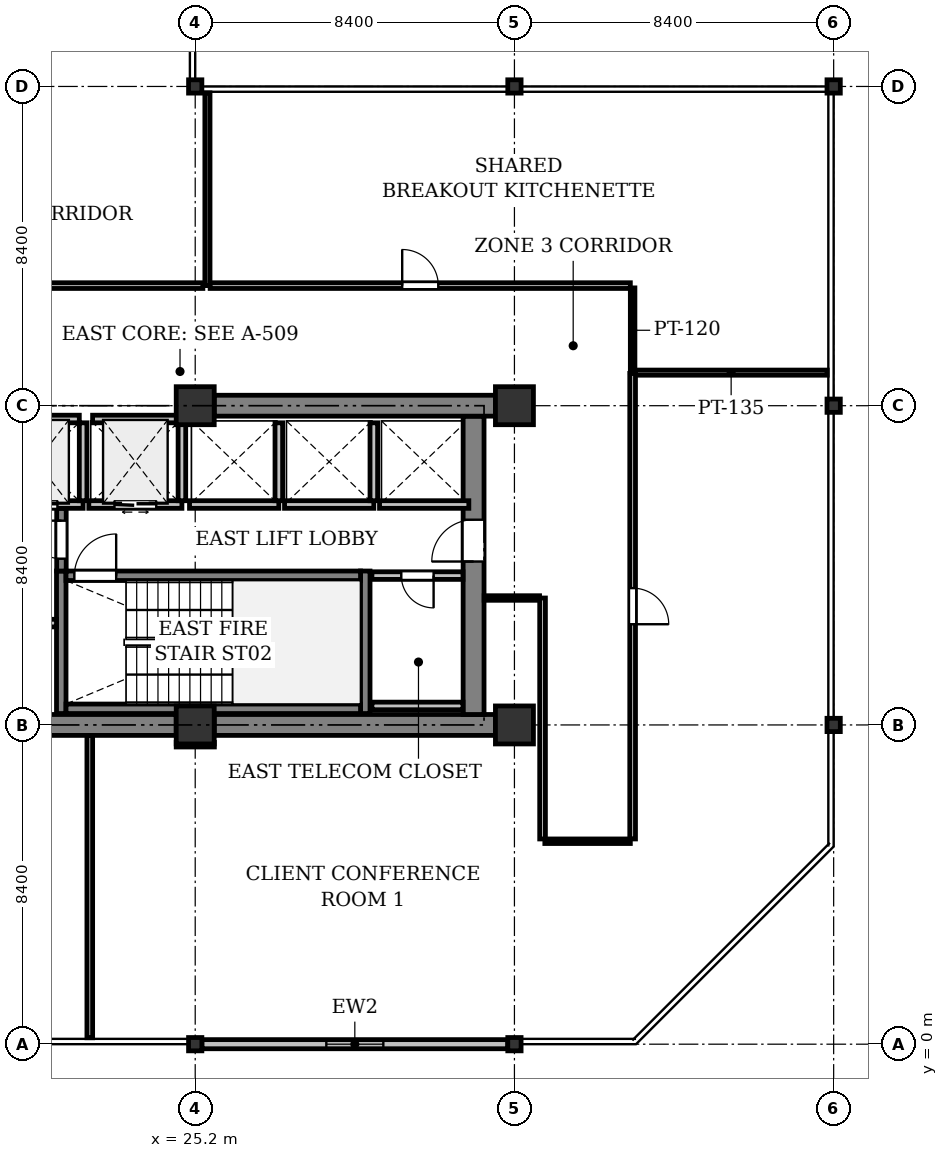
"""IFC4 building model, lengths in metres.
Left out: names, types, materials, properties, quantities, classifications, styles, units other than length and angle.
Written with IfcOpenShell. Run it as: python <this file> out.ifc"""

import sys

from ifc_helpers import new_model, si_unit, direction, frame, frame_2d, origin, origin_2d, place, context, subcontext, project, spatial, rectangle, i_section, extrude, element, fill, save


model = new_model("IFC4")
c1 = context("Model", 3, precision=1e-05, world=origin(), true_north=direction((0.0, 1.0)))
c2 = subcontext(c1, "Body", "Model", "MODEL_VIEW")
j1 = project(units=[si_unit("LENGTHUNIT", "METRE"), si_unit("PLANEANGLEUNIT", "RADIAN")], contexts=[c1])
p1 = place(None, origin())
s1 = spatial("IfcSite", under=j1, at=p1, CompositionType="ELEMENT")
p2 = place(p1, origin())
s2 = spatial("IfcBuilding", under=s1, at=p2, CompositionType="ELEMENT")
p3 = place(p2, frame((0.0, 0.0, 196.0)))
s3 = spatial("IfcBuildingStorey", under=s2, at=p3, CompositionType="ELEMENT", Elevation=196.0)
p4 = place(p3, frame((25.2, 0.0, 0.0), z_axis=(0.0, 0.0, 1.0), x_axis=(1.0, 0.0, 0.0)))
e1 = element("IfcColumn", 1, at=p4, inside=s3, PredefinedType="COLUMN", context=c2, shape_type="SweptSolid", body=[
    extrude(i_section(OverallWidth=0.35, OverallDepth=0.35, WebThickness=0.02, FlangeThickness=0.032, at=origin_2d()), origin(), (0.0, 0.0, 1.0), 4.1),
])
for number, where, z_axis, x_axis in (
    (2, (25.2, 8.4, 0.0), (0.0, 0.0, 1.0), (1.0, 0.0, 0.0)),
    (3, (25.2, 16.8, 0.0), (0.0, 0.0, 1.0), (1.0, 0.0, 0.0)),
):
    element("IfcColumn", number, at=place(p3, frame(where, z_axis=z_axis, x_axis=x_axis)), inside=s3, PredefinedType="COLUMN", context=c2, shape_type="SweptSolid", body=[
        extrude(rectangle(XDim=1.0, YDim=1.0, at=origin_2d()), origin(), (0.0, 0.0, 1.0), 4.1),
    ])
for number, where, z_axis, x_axis in (
    (4, (25.2, 25.2, 0.0), (0.0, 0.0, 1.0), (1.0, 0.0, 0.0)),
    (5, (33.6, 0.0, 0.0), (0.0, 0.0, 1.0), (1.0, 0.0, 0.0)),
):
    element("IfcColumn", number, at=place(p3, frame(where, z_axis=z_axis, x_axis=x_axis)), inside=s3, PredefinedType="COLUMN", context=c2, shape_type="SweptSolid", body=[
        extrude(i_section(OverallWidth=0.35, OverallDepth=0.35, WebThickness=0.02, FlangeThickness=0.032, at=origin_2d()), origin(), (0.0, 0.0, 1.0), 4.1),
    ])
for number, where, z_axis, x_axis in (
    (6, (33.6, 8.4, 0.0), (0.0, 0.0, 1.0), (1.0, 0.0, 0.0)),
    (7, (33.6, 16.8, 0.0), (0.0, 0.0, 1.0), (1.0, 0.0, 0.0)),
):
    element("IfcColumn", number, at=place(p3, frame(where, z_axis=z_axis, x_axis=x_axis)), inside=s3, PredefinedType="COLUMN", context=c2, shape_type="SweptSolid", body=[
        extrude(rectangle(XDim=1.0, YDim=1.0, at=origin_2d()), origin(), (0.0, 0.0, 1.0), 4.1),
    ])
for number, where, z_axis, x_axis in (
    (8, (33.6, 25.2, 0.0), (0.0, 0.0, 1.0), (1.0, 0.0, 0.0)),
    (9, (42.0, 8.4, 0.0), (0.0, 0.0, 1.0), (1.0, 0.0, 0.0)),
    (10, (42.0, 16.8, 0.0), (0.0, 0.0, 1.0), (1.0, 0.0, 0.0)),
    (11, (42.0, 25.2, 0.0), (0.0, 0.0, 1.0), (1.0, 0.0, 0.0)),
):
    element("IfcColumn", number, at=place(p3, frame(where, z_axis=z_axis, x_axis=x_axis)), inside=s3, PredefinedType="COLUMN", context=c2, shape_type="SweptSolid", body=[
        extrude(i_section(OverallWidth=0.35, OverallDepth=0.35, WebThickness=0.02, FlangeThickness=0.032, at=origin_2d()), origin(), (0.0, 0.0, 1.0), 4.1),
    ])
p5 = place(p3, frame((33.425, 0.0, 0.0), z_axis=(0.0, 0.0, 1.0), x_axis=(-1.0, 0.0, 0.0)))
e12 = element("IfcWall", 12, at=p5, inside=s3, PredefinedType="STANDARD", context=c2, shape_type="SweptSolid", body=[
    extrude(rectangle(XDim=8.05, YDim=0.24, at=frame_2d((4.025, 0.0))), origin(), (0.0, 0.0, 1.0), 3.525),
])
p6 = place(p5, frame((3.275, 0.0, 0.9)))
e13 = element("IfcOpeningElement", 13, at=p6, cuts=e12, PredefinedType="OPENING", context=c2, shape_type="SweptSolid", body=[
    extrude(rectangle(XDim=1.5, YDim=1.6, at=frame_2d((0.75, 0.8))), frame((0.0, 0.13, 0.0), z_axis=(0.0, -1.0, 0.0), x_axis=(1.0, 0.0, 0.0)), (0.0, 0.0, 1.0), 0.26),
])
p7 = place(p3, frame((17.3, 8.4, 0.0), z_axis=(0.0, 0.0, 1.0), x_axis=(1.0, 0.0, 0.0)))
e14 = element("IfcWall", 14, at=p7, inside=s3, PredefinedType="SHEAR", context=c2, shape_type="SweptSolid", body=[
    extrude(rectangle(XDim=7.4, YDim=0.55, at=frame_2d((3.7, 0.0))), origin(), (0.0, 0.0, 1.0), 3.825),
])
p8 = place(p3, frame((25.7, 8.4, 0.0), z_axis=(0.0, 0.0, 1.0), x_axis=(1.0, 0.0, 0.0)))
e15 = element("IfcWall", 15, at=p8, inside=s3, PredefinedType="SHEAR", context=c2, shape_type="SweptSolid", body=[
    extrude(rectangle(XDim=7.4, YDim=0.55, at=frame_2d((3.7, 0.0))), origin(), (0.0, 0.0, 1.0), 3.825),
])
p9 = place(p3, frame((32.525, 8.675, 0.0), z_axis=(0.0, 0.0, 1.0), x_axis=(0.0, 1.0, 0.0)))
e16 = element("IfcWall", 16, at=p9, inside=s3, PredefinedType="SHEAR", context=c2, shape_type="SweptSolid", body=[
    extrude(rectangle(XDim=7.85, YDim=0.55, at=frame_2d((3.925, 0.0))), origin(), (0.0, 0.0, 1.0), 3.825),
])
p10 = place(p9, frame((4.025, 0.0, 0.0)))
e17 = element("IfcOpeningElement", 17, at=p10, cuts=e16, PredefinedType="OPENING", context=c2, shape_type="SweptSolid", body=[
    extrude(rectangle(XDim=1.1, YDim=2.15, at=frame_2d((0.55, 1.075))), frame((0.0, 0.285, 0.0), z_axis=(0.0, -1.0, 0.0), x_axis=(1.0, 0.0, 0.0)), (0.0, 0.0, 1.0), 0.57),
])
p11 = place(p3, frame((25.7, 16.8, 0.0), z_axis=(0.0, 0.0, 1.0), x_axis=(1.0, 0.0, 0.0)))
e18 = element("IfcWall", 18, at=p11, inside=s3, PredefinedType="SHEAR", context=c2, shape_type="SweptSolid", body=[
    extrude(rectangle(XDim=7.4, YDim=0.55, at=frame_2d((3.7, 0.0))), origin(), (0.0, 0.0, 1.0), 3.825),
])
for number, where, z_axis, x_axis in (
    (19, (21.675, 8.7, 0.0), (0.0, 0.0, 1.0), (0.0, 1.0, 0.0)),
    (20, (29.675, 8.7, 0.0), (0.0, 0.0, 1.0), (0.0, 1.0, 0.0)),
):
    element("IfcWall", number, at=place(p3, frame(where, z_axis=z_axis, x_axis=x_axis)), inside=s3, PredefinedType="SHEAR", context=c2, shape_type="SweptSolid", body=[
        extrude(rectangle(XDim=3.75, YDim=0.25, at=frame_2d((1.875, 0.0))), origin(), (0.0, 0.0, 1.0), 3.825),
    ])
p12 = place(p3, frame((21.8, 8.825, 0.0), z_axis=(0.0, 0.0, 1.0), x_axis=(1.0, 0.0, 0.0)))
e21 = element("IfcWall", 21, at=p12, inside=s3, PredefinedType="SHEAR", context=c2, shape_type="SweptSolid", body=[
    extrude(rectangle(XDim=7.75, YDim=0.25, at=frame_2d((3.875, 0.0))), origin(), (0.0, 0.0, 1.0), 3.825),
])
p13 = place(p3, frame((21.8, 12.325, 0.0), z_axis=(0.0, 0.0, 1.0), x_axis=(1.0, 0.0, 0.0)))
e22 = element("IfcWall", 22, at=p13, inside=s3, PredefinedType="SHEAR", context=c2, shape_type="SweptSolid", body=[
    extrude(rectangle(XDim=7.75, YDim=0.25, at=frame_2d((3.875, 0.0))), origin(), (0.0, 0.0, 1.0), 3.825),
])
p14 = place(p13, frame((0.22, 0.0, 0.0)))
e23 = element("IfcOpeningElement", 23, at=p14, cuts=e22, PredefinedType="OPENING", context=c2, shape_type="SweptSolid", body=[
    extrude(rectangle(XDim=1.1, YDim=2.15, at=frame_2d((0.55, 1.075))), frame((0.0, 0.135, 0.0), z_axis=(0.0, -1.0, 0.0), x_axis=(1.0, 0.0, 0.0)), (0.0, 0.0, 1.0), 0.27),
])
p15 = place(p3, frame((20.2, 11.08, 0.0), z_axis=(0.0, 0.0, 1.0), x_axis=(1.0, 0.0, 0.0)))
e24 = element("IfcWall", 24, at=p15, inside=s3, PredefinedType="PARTITIONING", context=c2, shape_type="SweptSolid", body=[
    extrude(rectangle(XDim=1.35, YDim=0.2, at=frame_2d((0.675, 0.0))), origin(), (0.0, 0.0, 1.0), 3.825),
])
p16 = place(p3, frame((21.68, 12.45, 0.0), z_axis=(0.0, 0.0, 1.0), x_axis=(0.0, 1.0, 0.0)))
e25 = element("IfcWall", 25, at=p16, inside=s3, PredefinedType="SHEAR", context=c2, shape_type="SweptSolid", body=[
    extrude(rectangle(XDim=1.65, YDim=0.25, at=frame_2d((0.825, 0.0))), origin(), (0.0, 0.0, 1.0), 3.825),
])
p17 = place(p16, frame((0.325, 0.0, 0.0)))
e26 = element("IfcOpeningElement", 26, at=p17, cuts=e25, PredefinedType="OPENING", context=c2, shape_type="SweptSolid", body=[
    extrude(rectangle(XDim=1.0, YDim=2.15, at=frame_2d((0.5, 1.075))), frame((0.0, 0.135, 0.0), z_axis=(0.0, -1.0, 0.0), x_axis=(1.0, 0.0, 0.0)), (0.0, 0.0, 1.0), 0.27),
])
p18 = place(p3, frame((19.8, 14.2, 0.0), z_axis=(0.0, 0.0, 1.0), x_axis=(1.0, 0.0, 0.0)))
e27 = element("IfcWall", 27, at=p18, inside=s3, PredefinedType="PARTITIONING", context=c2, shape_type="SweptSolid", body=[
    extrude(rectangle(XDim=2.45, YDim=0.2, at=frame_2d((1.225, 0.0))), origin(), (0.0, 0.0, 1.0), 3.825),
])
p19 = place(p18, frame((0.675, 0.0, 0.0)))
e28 = element("IfcOpeningElement", 28, at=p19, cuts=e27, PredefinedType="OPENING", context=c2, shape_type="SweptSolid", body=[
    extrude(rectangle(XDim=1.1, YDim=2.2, at=frame_2d((0.55, 1.1))), frame((0.0, 0.11, 0.0), z_axis=(0.0, -1.0, 0.0), x_axis=(1.0, 0.0, 0.0)), (0.0, 0.0, 1.0), 0.22),
])
p20 = place(p3, frame((22.25, 14.3, 0.0), z_axis=(0.0, 0.0, 1.0), x_axis=(0.0, 1.0, 0.0)))
e29 = element("IfcWall", 29, at=p20, inside=s3, PredefinedType="PARTITIONING", context=c2, shape_type="SweptSolid", body=[
    extrude(rectangle(XDim=2.05, YDim=0.2, at=frame_2d((1.025, 0.0))), origin(), (0.0, 0.0, 1.0), 3.825),
])
p21 = place(p3, frame((19.9, 16.45, 0.0), z_axis=(0.0, 0.0, 1.0), x_axis=(1.0, 0.0, 0.0)))
e30 = element("IfcWall", 30, at=p21, inside=s3, PredefinedType="PARTITIONING", context=c2, shape_type="SweptSolid", body=[
    extrude(rectangle(XDim=2.25, YDim=0.2, at=frame_2d((1.125, 0.0))), origin(), (0.0, 0.0, 1.0), 3.825),
])
p22 = place(p3, frame((22.4, 14.2, 0.0), z_axis=(0.0, 0.0, 1.0), x_axis=(1.0, 0.0, 0.0)))
e31 = element("IfcWall", 31, at=p22, inside=s3, PredefinedType="PARTITIONING", context=c2, shape_type="SweptSolid", body=[
    extrude(rectangle(XDim=2.45, YDim=0.2, at=frame_2d((1.225, 0.0))), origin(), (0.0, 0.0, 1.0), 3.825),
])
p23 = place(p22, frame((0.675, 0.0, 0.0)))
e32 = element("IfcOpeningElement", 32, at=p23, cuts=e31, PredefinedType="OPENING", context=c2, shape_type="SweptSolid", body=[
    extrude(rectangle(XDim=1.1, YDim=2.2, at=frame_2d((0.55, 1.1))), frame((0.0, 0.11, 0.0), z_axis=(0.0, -1.0, 0.0), x_axis=(1.0, 0.0, 0.0)), (0.0, 0.0, 1.0), 0.22),
])
p24 = place(p3, frame((24.85, 14.3, 0.0), z_axis=(0.0, 0.0, 1.0), x_axis=(0.0, 1.0, 0.0)))
e33 = element("IfcWall", 33, at=p24, inside=s3, PredefinedType="PARTITIONING", context=c2, shape_type="SweptSolid", body=[
    extrude(rectangle(XDim=2.05, YDim=0.2, at=frame_2d((1.025, 0.0))), origin(), (0.0, 0.0, 1.0), 3.825),
])
p25 = place(p3, frame((22.5, 16.45, 0.0), z_axis=(0.0, 0.0, 1.0), x_axis=(1.0, 0.0, 0.0)))
e34 = element("IfcWall", 34, at=p25, inside=s3, PredefinedType="PARTITIONING", context=c2, shape_type="SweptSolid", body=[
    extrude(rectangle(XDim=2.25, YDim=0.2, at=frame_2d((1.125, 0.0))), origin(), (0.0, 0.0, 1.0), 3.825),
])
p26 = place(p3, frame((25.05, 14.2, 0.0), z_axis=(0.0, 0.0, 1.0), x_axis=(1.0, 0.0, 0.0)))
e35 = element("IfcWall", 35, at=p26, inside=s3, PredefinedType="PARTITIONING", context=c2, shape_type="SweptSolid", body=[
    extrude(rectangle(XDim=2.35, YDim=0.2, at=frame_2d((1.175, 0.0))), origin(), (0.0, 0.0, 1.0), 3.825),
])
p27 = place(p3, frame((27.4, 14.3, 0.0), z_axis=(0.0, 0.0, 1.0), x_axis=(0.0, 1.0, 0.0)))
e36 = element("IfcWall", 36, at=p27, inside=s3, PredefinedType="PARTITIONING", context=c2, shape_type="SweptSolid", body=[
    extrude(rectangle(XDim=2.05, YDim=0.2, at=frame_2d((1.025, 0.0))), origin(), (0.0, 0.0, 1.0), 3.825),
])
p28 = place(p3, frame((27.55, 14.2, 0.0), z_axis=(0.0, 0.0, 1.0), x_axis=(1.0, 0.0, 0.0)))
e37 = element("IfcWall", 37, at=p28, inside=s3, PredefinedType="PARTITIONING", context=c2, shape_type="SweptSolid", body=[
    extrude(rectangle(XDim=2.35, YDim=0.2, at=frame_2d((1.175, 0.0))), origin(), (0.0, 0.0, 1.0), 3.825),
])
p29 = place(p3, frame((29.9, 14.3, 0.0), z_axis=(0.0, 0.0, 1.0), x_axis=(0.0, 1.0, 0.0)))
e38 = element("IfcWall", 38, at=p29, inside=s3, PredefinedType="PARTITIONING", context=c2, shape_type="SweptSolid", body=[
    extrude(rectangle(XDim=2.05, YDim=0.2, at=frame_2d((1.025, 0.0))), origin(), (0.0, 0.0, 1.0), 3.825),
])
p30 = place(p3, frame((30.05, 14.2, 0.0), z_axis=(0.0, 0.0, 1.0), x_axis=(1.0, 0.0, 0.0)))
e39 = element("IfcWall", 39, at=p30, inside=s3, PredefinedType="PARTITIONING", context=c2, shape_type="SweptSolid", body=[
    extrude(rectangle(XDim=2.35, YDim=0.2, at=frame_2d((1.175, 0.0))), origin(), (0.0, 0.0, 1.0), 3.825),
])
p31 = place(p3, frame((32.246, 12.33, 0.0), z_axis=(0.0, 0.0, 1.0), x_axis=(-1.0, 0.0, 0.0)))
e40 = element("IfcWall", 40, at=p31, inside=s3, PredefinedType="PARTITIONING", context=c2, shape_type="SweptSolid", body=[
    extrude(rectangle(XDim=2.396, YDim=0.2, at=frame_2d((1.198, 0.0))), origin(), (0.0, 0.0, 1.0), 3.825),
])
p32 = place(p31, frame((0.773, 0.0, 0.0)))
e41 = element("IfcOpeningElement", 41, at=p32, cuts=e40, PredefinedType="OPENING", context=c2, shape_type="SweptSolid", body=[
    extrude(rectangle(XDim=0.85, YDim=2.15, at=frame_2d((0.425, 1.075))), frame((0.0, 0.11, 0.0), z_axis=(0.0, -1.0, 0.0), x_axis=(1.0, 0.0, 0.0)), (0.0, 0.0, 1.0), 0.22),
])
p33 = place(p3, frame((29.85, 8.9, 0.0), z_axis=(0.0, 0.0, 1.0), x_axis=(1.0, 0.0, 0.0)))
e42 = element("IfcWall", 42, at=p33, inside=s3, PredefinedType="PARTITIONING", context=c2, shape_type="SweptSolid", body=[
    extrude(rectangle(XDim=2.396, YDim=0.2, at=frame_2d((1.198, 0.0))), origin(), (0.0, 0.0, 1.0), 3.825),
])
p34 = place(p3, frame((36.71, 19.9, 0.0), z_axis=(0.0, 0.0, 1.0), x_axis=(0.0, -1.0, 0.0)))
e43 = element("IfcWall", 43, at=p34, inside=s3, PredefinedType="PARTITIONING", context=c2, shape_type="SweptSolid", body=[
    extrude(rectangle(XDim=2.23, YDim=0.12, at=frame_2d((1.115, 0.0))), origin(), (0.0, 0.0, 1.0), 3.825),
])
p35 = place(p3, frame((36.774, 17.67, 0.0), z_axis=(0.0, 0.0, 1.0), x_axis=(1.0, 0.0, 0.0)))
e44 = element("IfcWall", 44, at=p35, inside=s3, PredefinedType="PARTITIONING", context=c2, shape_type="SweptSolid", body=[
    extrude(rectangle(XDim=5.057, YDim=0.135, at=frame_2d((2.529, 0.0))), origin(), (0.0, 0.0, 1.0), 3.518),
])
p36 = place(p3, frame((25.521, 25.031, 0.0), z_axis=(0.0, 0.0, 1.0), x_axis=(0.0, -1.0, 0.0)))
e45 = element("IfcWall", 45, at=p36, inside=s3, PredefinedType="PARTITIONING", context=c2, shape_type="SweptSolid", body=[
    extrude(rectangle(XDim=5.071, YDim=0.135, at=frame_2d((2.536, 0.0))), origin(), (0.0, 0.0, 1.0), 3.825),
])
p37 = place(p3, frame((25.593, 19.96, 0.0), z_axis=(0.0, 0.0, 1.0), x_axis=(1.0, 0.0, 0.0)))
e46 = element("IfcWall", 46, at=p37, inside=s3, PredefinedType="PARTITIONING", context=c2, shape_type="SweptSolid", body=[
    extrude(rectangle(XDim=11.057, YDim=0.15, at=frame_2d((5.528, 0.0))), origin(), (0.0, 0.0, 1.0), 3.371),
])
p38 = place(p37, frame((5.053, 0.0, 0.0)))
e47 = element("IfcOpeningElement", 47, at=p38, cuts=e46, PredefinedType="OPENING", context=c2, shape_type="SweptSolid", body=[
    extrude(rectangle(XDim=0.95, YDim=2.15, at=frame_2d((0.475, 1.075))), frame((0.0, 0.085, 0.0), z_axis=(0.0, -1.0, 0.0), x_axis=(1.0, 0.0, 0.0)), (0.0, 0.0, 1.0), 0.17),
])
p39 = place(p3, frame((7.774, 19.96, 0.0), z_axis=(0.0, 0.0, 1.0), x_axis=(1.0, 0.0, 0.0)))
e48 = element("IfcWall", 48, at=p39, inside=s3, PredefinedType="PARTITIONING", context=c2, shape_type="SweptSolid", body=[
    extrude(rectangle(XDim=17.628, YDim=0.15, at=frame_2d((8.814, 0.0))), origin(), (0.0, 0.0, 1.0), 3.371),
])
p40 = place(p39, frame((8.339, 0.0, 0.0)))
e49 = element("IfcOpeningElement", 49, at=p40, cuts=e48, PredefinedType="OPENING", context=c2, shape_type="SweptSolid", body=[
    extrude(rectangle(XDim=0.95, YDim=2.15, at=frame_2d((0.475, 1.075))), frame((0.0, 0.085, 0.0), z_axis=(0.0, -1.0, 0.0), x_axis=(1.0, 0.0, 0.0)), (0.0, 0.0, 1.0), 0.17),
])
p41 = place(p3, frame((25.704, 7.88, 0.0), z_axis=(0.0, 0.0, 1.0), x_axis=(-0.999999881717, -0.000486381265, 0.0)))
e50 = element("IfcWall", 50, at=p41, inside=s3, PredefinedType="PARTITIONING", context=c2, shape_type="SweptSolid", body=[
    extrude(rectangle(XDim=1.004, YDim=0.12, at=frame_2d((0.502, 0.0))), origin(), (0.0, 0.0, 1.0), 3.371),
])
p42 = place(p3, frame((22.426, 8.121, 0.0), z_axis=(0.0, 0.0, 1.0), x_axis=(0.0, -1.0, 0.0)))
e51 = element("IfcWall", 51, at=p42, inside=s3, PredefinedType="PARTITIONING", context=c2, shape_type="SweptSolid", body=[
    extrude(rectangle(XDim=7.952, YDim=0.15, at=frame_2d((3.976, 0.0))), origin(), (0.0, 0.0, 1.0), 3.825),
])
p43 = place(p3, frame((36.71, 17.65, 0.0), z_axis=(0.0, 0.0, 1.0), x_axis=(0.0, -1.0, 0.0)))
e52 = element("IfcWall", 52, at=p43, inside=s3, PredefinedType="PARTITIONING", context=c2, shape_type="SweptSolid", body=[
    extrude(rectangle(XDim=12.25, YDim=0.15, at=frame_2d((6.125, 0.0))), origin(), (0.0, 0.0, 1.0), 3.365),
])
p44 = place(p43, frame((5.65, 0.0, 0.0)))
e53 = element("IfcOpeningElement", 53, at=p44, cuts=e52, PredefinedType="OPENING", context=c2, shape_type="SweptSolid", body=[
    extrude(rectangle(XDim=0.95, YDim=2.15, at=frame_2d((0.475, 1.075))), frame((0.0, 0.085, 0.0), z_axis=(0.0, -1.0, 0.0), x_axis=(1.0, 0.0, 0.0)), (0.0, 0.0, 1.0), 0.17),
])
p45 = place(p3, frame((36.65, 5.34, 0.0), z_axis=(0.0, 0.0, 1.0), x_axis=(-1.0, 0.0, 0.0)))
e54 = element("IfcWall", 54, at=p45, inside=s3, PredefinedType="PARTITIONING", context=c2, shape_type="SweptSolid", body=[
    extrude(rectangle(XDim=2.25, YDim=0.12, at=frame_2d((1.125, 0.0))), origin(), (0.0, 0.0, 1.0), 3.825),
])
p46 = place(p3, frame((34.34, 5.4, 0.0), z_axis=(0.0, 0.0, 1.0), x_axis=(0.0, 1.0, 0.0)))
e55 = element("IfcWall", 55, at=p46, inside=s3, PredefinedType="PARTITIONING", context=c2, shape_type="SweptSolid", body=[
    extrude(rectangle(XDim=6.34, YDim=0.15, at=frame_2d((3.17, 0.0))), origin(), (0.0, 0.0, 1.0), 3.365),
])
p47 = place(p3, frame((34.261, 11.74, 0.0), z_axis=(0.0, 0.0, 1.0), x_axis=(-1.0, 0.0, 0.0)))
e56 = element("IfcWall", 56, at=p47, inside=s3, PredefinedType="PARTITIONING", context=c2, shape_type="SweptSolid", body=[
    extrude(rectangle(XDim=1.457, YDim=0.12, at=frame_2d((0.729, 0.0))), origin(), (0.0, 0.0, 1.0), 3.371),
])
p48 = place(p6, origin())
e57 = element("IfcWindow", 57, at=p48, inside=s3, PartitioningType="SINGLE_PANEL", PredefinedType="WINDOW", context=c2, shape_type="SweptSolid", body=[
    extrude(rectangle(XDim=1.5, YDim=1.6, at=frame_2d((0.75, 0.8))), frame((0.0, 0.03, 0.0), z_axis=(0.0, -1.0, 0.0), x_axis=(1.0, 0.0, 0.0)), (0.0, 0.0, 1.0), 0.06),
])
fill(e13, e57)
p49 = place(p10, origin())
e58 = element("IfcDoor", 58, at=p49, inside=s3, OperationType="SINGLE_SWING_LEFT", PredefinedType="DOOR", context=c2, shape_type="SweptSolid", body=[
    extrude(rectangle(XDim=1.1, YDim=2.15, at=frame_2d((0.55, 1.075))), frame((0.0, 0.025, 0.0), z_axis=(0.0, -1.0, 0.0), x_axis=(1.0, 0.0, 0.0)), (0.0, 0.0, 1.0), 0.05),
])
fill(e17, e58)
p50 = place(p14, origin())
e59 = element("IfcDoor", 59, at=p50, inside=s3, OperationType="SINGLE_SWING_RIGHT", PredefinedType="DOOR", context=c2, shape_type="SweptSolid", body=[
    extrude(rectangle(XDim=1.1, YDim=2.15, at=frame_2d((0.55, 1.075))), frame((0.0, 0.025, 0.0), z_axis=(0.0, -1.0, 0.0), x_axis=(1.0, 0.0, 0.0)), (0.0, 0.0, 1.0), 0.05),
])
fill(e23, e59)
p51 = place(p17, origin())
e60 = element("IfcDoor", 60, at=p51, inside=s3, OperationType="SINGLE_SWING_RIGHT", PredefinedType="DOOR", context=c2, shape_type="SweptSolid", body=[
    extrude(rectangle(XDim=1.0, YDim=2.15, at=frame_2d((0.5, 1.075))), frame((0.0, 0.025, 0.0), z_axis=(0.0, -1.0, 0.0), x_axis=(1.0, 0.0, 0.0)), (0.0, 0.0, 1.0), 0.05),
])
fill(e26, e60)
p52 = place(p19, origin())
e61 = element("IfcDoor", 61, at=p52, inside=s3, OperationType="DOUBLE_DOOR_SLIDING", PredefinedType="DOOR", context=c2, shape_type="SweptSolid", body=[
    extrude(rectangle(XDim=1.1, YDim=2.2, at=frame_2d((0.55, 1.1))), frame((0.0, 0.025, 0.0), z_axis=(0.0, -1.0, 0.0), x_axis=(1.0, 0.0, 0.0)), (0.0, 0.0, 1.0), 0.05),
])
fill(e28, e61)
p53 = place(p23, origin())
e62 = element("IfcDoor", 62, at=p53, inside=s3, OperationType="DOUBLE_DOOR_SLIDING", PredefinedType="DOOR", context=c2, shape_type="SweptSolid", body=[
    extrude(rectangle(XDim=1.1, YDim=2.2, at=frame_2d((0.55, 1.1))), frame((0.0, 0.025, 0.0), z_axis=(0.0, -1.0, 0.0), x_axis=(1.0, 0.0, 0.0)), (0.0, 0.0, 1.0), 0.05),
])
fill(e32, e62)
p54 = place(p32, origin())
e63 = element("IfcDoor", 63, at=p54, inside=s3, OperationType="SINGLE_SWING_LEFT", PredefinedType="DOOR", context=c2, shape_type="SweptSolid", body=[
    extrude(rectangle(XDim=0.85, YDim=2.15, at=frame_2d((0.425, 1.075))), frame((0.0, 0.025, 0.0), z_axis=(0.0, -1.0, 0.0), x_axis=(1.0, 0.0, 0.0)), (0.0, 0.0, 1.0), 0.05),
])
fill(e41, e63)
p55 = place(p38, origin())
e64 = element("IfcDoor", 64, at=p55, inside=s3, OperationType="SINGLE_SWING_LEFT", PredefinedType="DOOR", context=c2, shape_type="SweptSolid", body=[
    extrude(rectangle(XDim=0.95, YDim=2.15, at=frame_2d((0.475, 1.075))), frame((0.0, 0.025, 0.0), z_axis=(0.0, -1.0, 0.0), x_axis=(1.0, 0.0, 0.0)), (0.0, 0.0, 1.0), 0.05),
])
fill(e47, e64)
p56 = place(p44, origin())
e65 = element("IfcDoor", 65, at=p56, inside=s3, OperationType="SINGLE_SWING_RIGHT", PredefinedType="DOOR", context=c2, shape_type="SweptSolid", body=[
    extrude(rectangle(XDim=0.95, YDim=2.15, at=frame_2d((0.475, 1.075))), frame((0.0, 0.025, 0.0), z_axis=(0.0, -1.0, 0.0), x_axis=(1.0, 0.0, 0.0)), (0.0, 0.0, 1.0), 0.05),
])
fill(e53, e65)
save(model, sys.argv[1])
